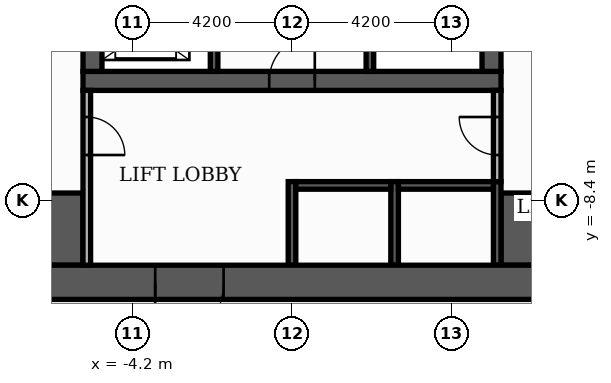
"""IFC4 building model, lengths in metres.
Left out: names, types, materials, properties, quantities, classifications, styles, units other than length and angle.
Written with IfcOpenShell. Run it as: python <this file> out.ifc"""

import sys

from ifc_helpers import new_model, si_unit, direction, frame, frame_2d, origin, place, context, subcontext, project, spatial, rectangle, extrude, element, fill, save


model = new_model("IFC4")
c1 = context("Model", 3, precision=1e-05, world=origin(), true_north=direction((0.0, 1.0)))
c2 = subcontext(c1, "Body", "Model", "MODEL_VIEW")
j1 = project(units=[si_unit("LENGTHUNIT", "METRE"), si_unit("PLANEANGLEUNIT", "RADIAN")], contexts=[c1])
p1 = place(None, origin())
s1 = spatial("IfcSite", under=j1, at=p1, CompositionType="ELEMENT")
p2 = place(p1, origin())
s2 = spatial("IfcBuilding", under=s1, at=p2, CompositionType="ELEMENT")
p3 = place(p2, frame((0.0, 0.0, -4.2)))
s3 = spatial("IfcBuildingStorey", under=s2, at=p3, CompositionType="ELEMENT", Elevation=-4.2)
p4 = place(p3, frame((-5.5, -5.25, 0.0), z_axis=(0.0, 0.0, 1.0), x_axis=(1.0, 0.0, 0.0)))
e1 = element("IfcWall", 1, at=p4, inside=s3, PredefinedType="SHEAR", context=c2, shape_type="SweptSolid", body=[
    extrude(rectangle(XDim=11.0, YDim=0.5, at=frame_2d((5.5, 0.0))), origin(), (0.0, 0.0, 1.0), 3.78),
])
p5 = place(p4, frame((4.9, 0.0, 0.0)))
e2 = element("IfcOpeningElement", 2, at=p5, cuts=e1, PredefinedType="OPENING", context=c2, shape_type="SweptSolid", body=[
    extrude(rectangle(XDim=1.2, YDim=2.1, at=frame_2d((0.6, 1.05))), frame((0.0, 0.26, 0.0), z_axis=(0.0, -1.0, 0.0), x_axis=(1.0, 0.0, 0.0)), (0.0, 0.0, 1.0), 0.52),
])
for number, where, z_axis, x_axis in (
    (3, (-5.25, -5.0, 0.0), (0.0, 0.0, 1.0), (0.0, 1.0, 0.0)),
    (4, (5.25, -5.0, 0.0), (0.0, 0.0, 1.0), (0.0, 1.0, 0.0)),
):
    element("IfcWall", number, at=place(p3, frame(where, z_axis=z_axis, x_axis=x_axis)), inside=s3, PredefinedType="SHEAR", context=c2, shape_type="SweptSolid", body=[
        extrude(rectangle(XDim=10.5, YDim=0.5, at=frame_2d((5.25, 0.0))), origin(), (0.0, 0.0, 1.0), 3.78),
    ])
for number, where, z_axis, x_axis in (
    (5, (-10.1, -9.15, 0.0), (0.0, 0.0, 1.0), (1.0, 0.0, 0.0)),
    (6, (5.5, -9.15, 0.0), (0.0, 0.0, 1.0), (1.0, 0.0, 0.0)),
):
    element("IfcWall", number, at=place(p3, frame(where, z_axis=z_axis, x_axis=x_axis)), inside=s3, PredefinedType="SHEAR", context=c2, shape_type="SweptSolid", body=[
        extrude(rectangle(XDim=4.6, YDim=1.9, at=frame_2d((2.3, 0.0))), origin(), (0.0, 0.0, 1.0), 3.78),
    ])
p6 = place(p3, frame((2.05, -5.0, 0.0), z_axis=(0.0, 0.0, 1.0), x_axis=(0.0, 1.0, 0.0)))
e7 = element("IfcWall", 7, at=p6, inside=s3, PredefinedType="SHEAR", context=c2, shape_type="SweptSolid", body=[
    extrude(rectangle(XDim=6.6, YDim=0.2, at=frame_2d((3.3, 0.0))), origin(), (0.0, 0.0, 1.0), 3.78),
])
p7 = place(p6, frame((5.25, 0.0, 0.0)))
e8 = element("IfcOpeningElement", 8, at=p7, cuts=e7, PredefinedType="OPENING", context=c2, shape_type="SweptSolid", body=[
    extrude(rectangle(XDim=1.0, YDim=2.1, at=frame_2d((0.5, 1.05))), frame((0.0, 0.11, 0.0), z_axis=(0.0, -1.0, 0.0), x_axis=(1.0, 0.0, 0.0)), (0.0, 0.0, 1.0), 0.22),
])
for number, where, z_axis, x_axis in (
    (9, (0.0, -10.1, 0.0), (0.0, 0.0, 1.0), (0.0, 1.0, 0.0)),
    (10, (2.7, -10.1, 0.0), (0.0, 0.0, 1.0), (0.0, 1.0, 0.0)),
    (11, (5.4, -10.1, 0.0), (0.0, 0.0, 1.0), (0.0, 1.0, 0.0)),
):
    element("IfcWall", number, at=place(p3, frame(where, z_axis=z_axis, x_axis=x_axis)), inside=s3, PredefinedType="SHEAR", context=c2, shape_type="SweptSolid", body=[
        extrude(rectangle(XDim=2.2, YDim=0.2, at=frame_2d((1.1, 0.0))), origin(), (0.0, 0.0, 1.0), 3.78),
    ])
for number, where, z_axis, x_axis in (
    (12, (0.1, -8.0, 0.0), (0.0, 0.0, 1.0), (1.0, 0.0, 0.0)),
    (13, (2.8, -8.0, 0.0), (0.0, 0.0, 1.0), (1.0, 0.0, 0.0)),
):
    element("IfcWall", number, at=place(p3, frame(where, z_axis=z_axis, x_axis=x_axis)), inside=s3, PredefinedType="SHEAR", context=c2, shape_type="SweptSolid", body=[
        extrude(rectangle(XDim=2.5, YDim=0.2, at=frame_2d((1.25, 0.0))), origin(), (0.0, 0.0, 1.0), 3.78),
    ])
p8 = place(p3, frame((-2.05, -5.0, 0.0), z_axis=(0.0, 0.0, 1.0), x_axis=(0.0, 1.0, 0.0)))
e14 = element("IfcWall", 14, at=p8, inside=s3, PredefinedType="SHEAR", context=c2, shape_type="SweptSolid", body=[
    extrude(rectangle(XDim=3.4, YDim=0.2, at=frame_2d((1.7, 0.0))), origin(), (0.0, 0.0, 1.0), 3.78),
])
p9 = place(p8, frame((0.55, 0.0, 0.0)))
e15 = element("IfcOpeningElement", 15, at=p9, cuts=e14, PredefinedType="OPENING", context=c2, shape_type="SweptSolid", body=[
    extrude(rectangle(XDim=1.1, YDim=2.1, at=frame_2d((0.55, 1.05))), frame((0.0, 0.11, 0.0), z_axis=(0.0, -1.0, 0.0), x_axis=(1.0, 0.0, 0.0)), (0.0, 0.0, 1.0), 0.22),
])
p10 = place(p8, frame((2.45, 0.0, 0.0)))
e16 = element("IfcOpeningElement", 16, at=p10, cuts=e14, PredefinedType="OPENING", context=c2, shape_type="SweptSolid", body=[
    extrude(rectangle(XDim=0.8, YDim=2.1, at=frame_2d((0.4, 1.05))), frame((0.0, 0.11, 0.0), z_axis=(0.0, -1.0, 0.0), x_axis=(1.0, 0.0, 0.0)), (0.0, 0.0, 1.0), 0.22),
])
p11 = place(p3, frame((-11.0, -10.55, 0.0), z_axis=(0.0, 0.0, 1.0), x_axis=(1.0, 0.0, 0.0)))
e17 = element("IfcWall", 17, at=p11, inside=s3, PredefinedType="SHEAR", context=c2, shape_type="SweptSolid", body=[
    extrude(rectangle(XDim=22.0, YDim=0.9, at=frame_2d((11.0, 0.0))), origin(), (0.0, 0.0, 1.0), 3.78),
])
p12 = place(p11, frame((7.4, 0.0, 0.0)))
e18 = element("IfcOpeningElement", 18, at=p12, cuts=e17, PredefinedType="OPENING", context=c2, shape_type="SweptSolid", body=[
    extrude(rectangle(XDim=1.8, YDim=2.2, at=frame_2d((0.9, 1.1))), frame((0.0, 0.46, 0.0), z_axis=(0.0, -1.0, 0.0), x_axis=(1.0, 0.0, 0.0)), (0.0, 0.0, 1.0), 0.92),
])
p13 = place(p3, frame((-5.4, -10.1, 0.0), z_axis=(0.0, 0.0, 1.0), x_axis=(0.0, 1.0, 0.0)))
e19 = element("IfcWall", 19, at=p13, inside=s3, PredefinedType="PARTITIONING", context=c2, shape_type="SweptSolid", body=[
    extrude(rectangle(XDim=4.6, YDim=0.2, at=frame_2d((2.3, 0.0))), origin(), (0.0, 0.0, 1.0), 3.78),
])
p14 = place(p13, frame((2.9, 0.0, 0.0)))
e20 = element("IfcOpeningElement", 20, at=p14, cuts=e19, PredefinedType="OPENING", context=c2, shape_type="SweptSolid", body=[
    extrude(rectangle(XDim=1.0, YDim=2.1, at=frame_2d((0.5, 1.05))), frame((0.0, 0.11, 0.0), z_axis=(0.0, -1.0, 0.0), x_axis=(1.0, 0.0, 0.0)), (0.0, 0.0, 1.0), 0.22),
])
p15 = place(p3, frame((5.4, -7.9, 0.0), z_axis=(0.0, 0.0, 1.0), x_axis=(0.0, 1.0, 0.0)))
e21 = element("IfcWall", 21, at=p15, inside=s3, PredefinedType="PARTITIONING", context=c2, shape_type="SweptSolid", body=[
    extrude(rectangle(XDim=2.4, YDim=0.2, at=frame_2d((1.2, 0.0))), origin(), (0.0, 0.0, 1.0), 3.78),
])
p16 = place(p15, frame((0.7, 0.0, 0.0)))
e22 = element("IfcOpeningElement", 22, at=p16, cuts=e21, PredefinedType="OPENING", context=c2, shape_type="SweptSolid", body=[
    extrude(rectangle(XDim=1.0, YDim=2.1, at=frame_2d((0.5, 1.05))), frame((0.0, 0.11, 0.0), z_axis=(0.0, -1.0, 0.0), x_axis=(1.0, 0.0, 0.0)), (0.0, 0.0, 1.0), 0.22),
])
p17 = place(p5, origin())
e23 = element("IfcDoor", 23, at=p17, inside=s3, OperationType="SINGLE_SWING_RIGHT", PredefinedType="DOOR", context=c2, shape_type="SweptSolid", body=[
    extrude(rectangle(XDim=1.2, YDim=2.1, at=frame_2d((0.6, 1.05))), frame((0.0, 0.025, 0.0), z_axis=(0.0, -1.0, 0.0), x_axis=(1.0, 0.0, 0.0)), (0.0, 0.0, 1.0), 0.05),
])
fill(e2, e23)
p18 = place(p14, frame((1.0, 0.0, 0.0), z_axis=(0.0, 0.0, 1.0), x_axis=(-1.0, 0.0, 0.0)))
e24 = element("IfcDoor", 24, at=p18, inside=s3, OperationType="SINGLE_SWING_LEFT", PredefinedType="DOOR", context=c2, shape_type="SweptSolid", body=[
    extrude(rectangle(XDim=1.0, YDim=2.1, at=frame_2d((0.5, 1.05))), frame((0.0, 0.025, 0.0), z_axis=(0.0, -1.0, 0.0), x_axis=(1.0, 0.0, 0.0)), (0.0, 0.0, 1.0), 0.05),
])
fill(e20, e24)
p19 = place(p16, origin())
e25 = element("IfcDoor", 25, at=p19, inside=s3, OperationType="SINGLE_SWING_RIGHT", PredefinedType="DOOR", context=c2, shape_type="SweptSolid", body=[
    extrude(rectangle(XDim=1.0, YDim=2.1, at=frame_2d((0.5, 1.05))), frame((0.0, 0.025, 0.0), z_axis=(0.0, -1.0, 0.0), x_axis=(1.0, 0.0, 0.0)), (0.0, 0.0, 1.0), 0.05),
])
fill(e22, e25)
p20 = place(p12, frame((1.8, 0.0, 0.0), z_axis=(0.0, 0.0, 1.0), x_axis=(-1.0, 0.0, 0.0)))
e26 = element("IfcDoor", 26, at=p20, inside=s3, OperationType="DOUBLE_DOOR_SINGLE_SWING", PredefinedType="DOOR", context=c2, shape_type="SweptSolid", body=[
    extrude(rectangle(XDim=1.8, YDim=2.2, at=frame_2d((0.9, 1.1))), frame((0.0, 0.025, 0.0), z_axis=(0.0, -1.0, 0.0), x_axis=(1.0, 0.0, 0.0)), (0.0, 0.0, 1.0), 0.05),
])
fill(e18, e26)
save(model, sys.argv[1])
